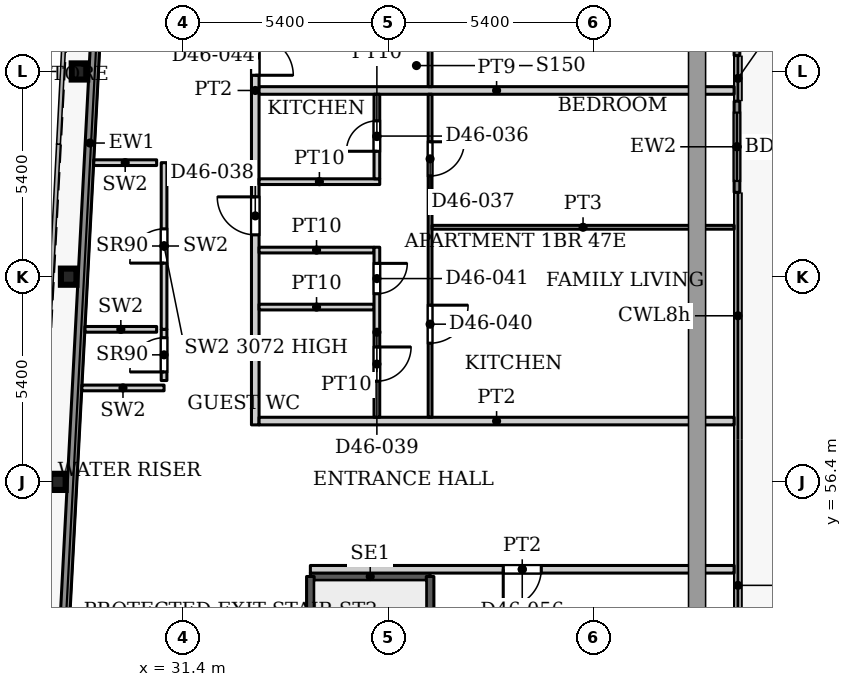
"""IFC4 building model, lengths in metres.
Left out: names, types, materials, properties, quantities, classifications, styles, units other than length and angle.
Written with IfcOpenShell. Run it as: python <this file> out.ifc"""

import sys

from ifc_helpers import new_model, si_unit, direction, frame, frame_2d, origin, origin_2d, place, context, subcontext, project, spatial, rectangle, i_section, extrude, source, transform, mapped, element, fill, save


model = new_model("IFC4")
c1 = context("Model", 3, precision=1e-05, world=origin(), true_north=direction((0.0, 1.0)))
c2 = subcontext(c1, "Body", "Model", "MODEL_VIEW")
j1 = project(units=[si_unit("LENGTHUNIT", "METRE"), si_unit("PLANEANGLEUNIT", "RADIAN")], contexts=[c1])
p1 = place(None, origin())
s1 = spatial("IfcSite", under=j1, at=p1, CompositionType="ELEMENT")
p2 = place(p1, origin())
s2 = spatial("IfcBuilding", under=s1, at=p2, CompositionType="ELEMENT")
p3 = place(p2, frame((0.0, 0.0, 199.4)))
s3 = spatial("IfcBuildingStorey", under=s2, at=p3, CompositionType="ELEMENT", Elevation=199.4)
for number, where, z_axis, x_axis in (
    (1, (28.106, 56.4, 0.0), (0.0, 0.0, 1.0), (1.0, 0.0, 0.0)),
    (2, (28.39, 61.8, 0.0), (0.0, 0.0, 1.0), (1.0, 0.0, 0.0)),
    (3, (28.674, 67.2, 0.0), (0.0, 0.0, 1.0), (1.0, 0.0, 0.0)),
):
    element("IfcColumn", number, at=place(p3, frame(where, z_axis=z_axis, x_axis=x_axis)), inside=s3, PredefinedType="COLUMN", context=c2, shape_type="SweptSolid", body=[
        extrude(i_section(OverallWidth=0.409, OverallDepth=0.425, WebThickness=0.033, FlangeThickness=0.052, FilletRadius=0.013, at=origin_2d()), origin(), (0.0, 0.0, 1.0), 3.9),
    ])
p4 = place(p3, frame((27.195, 31.969, 0.0), z_axis=(0.0, 0.0, 1.0), x_axis=(0.052554995867, 0.998618031286, 0.0)))
e4 = element("IfcWall", 4, at=p4, inside=s3, PredefinedType="SOLIDWALL", context=c2, shape_type="SweptSolid", body=[
    extrude(rectangle(XDim=66.787, YDim=0.25, at=frame_2d((33.394, 0.0))), origin(), (0.0, 0.0, 1.0), 3.75),
])
p5 = place(p3, frame((45.975, 70.018, 0.0), z_axis=(0.0, 0.0, 1.0), x_axis=(0.0, -1.0, 0.0)))
e5 = element("IfcWall", 5, at=p5, inside=s3, PredefinedType="SOLIDWALL", context=c2, shape_type="SweptSolid", body=[
    extrude(rectangle(XDim=2.4, YDim=0.15, at=frame_2d((1.2, 0.0))), origin(), (0.0, 0.0, 1.0), 3.75),
])
p6 = place(p5, frame((0.3, 0.0, 0.0)))
e6 = element("IfcOpeningElement", 6, at=p6, cuts=e5, PredefinedType="OPENING", context=c2, shape_type="SweptSolid", body=[
    extrude(rectangle(XDim=1.8, YDim=2.4, at=frame_2d((0.9, 1.2))), frame((0.0, 0.085, 0.0), z_axis=(0.0, -1.0, 0.0), x_axis=(1.0, 0.0, 0.0)), (0.0, 0.0, 1.0), 0.17),
])
p7 = place(p3, frame((45.975, 66.418, 0.0), z_axis=(0.0, 0.0, 1.0), x_axis=(0.0, -1.0, 0.0)))
e7 = element("IfcWall", 7, at=p7, inside=s3, PredefinedType="SOLIDWALL", context=c2, shape_type="SweptSolid", body=[
    extrude(rectangle(XDim=2.4, YDim=0.15, at=frame_2d((1.2, 0.0))), origin(), (0.0, 0.0, 1.0), 3.75),
])
p8 = place(p7, frame((0.3, 0.0, 0.0)))
e8 = element("IfcOpeningElement", 8, at=p8, cuts=e7, PredefinedType="OPENING", context=c2, shape_type="SweptSolid", body=[
    extrude(rectangle(XDim=1.8, YDim=2.4, at=frame_2d((0.9, 1.2))), frame((0.0, 0.085, 0.0), z_axis=(0.0, -1.0, 0.0), x_axis=(1.0, 0.0, 0.0)), (0.0, 0.0, 1.0), 0.17),
])
p9 = place(p3, frame((34.75, 53.91, 0.0), z_axis=(0.0, 0.0, 1.0), x_axis=(1.0, 0.0, 0.0)))
e9 = element("IfcWall", 9, at=p9, inside=s3, PredefinedType="SHEAR", context=c2, shape_type="SweptSolid", body=[
    extrude(rectangle(XDim=3.15, YDim=0.2, at=frame_2d((1.575, 0.0))), origin(), (0.0, 0.0, 1.0), 3.9),
])
p10 = place(p3, frame((34.75, 47.5, 0.0), z_axis=(0.0, 0.0, 1.0), x_axis=(0.0, 1.0, 0.0)))
e10 = element("IfcWall", 10, at=p10, inside=s3, PredefinedType="SHEAR", context=c2, shape_type="SweptSolid", body=[
    extrude(rectangle(XDim=6.41, YDim=0.2, at=frame_2d((3.205, 0.0))), origin(), (0.0, 0.0, 1.0), 3.9),
])
p11 = place(p3, frame((37.9, 44.75, 0.0), z_axis=(0.0, 0.0, 1.0), x_axis=(0.0, 1.0, 0.0)))
e11 = element("IfcWall", 11, at=p11, inside=s3, PredefinedType="SHEAR", context=c2, shape_type="SweptSolid", body=[
    extrude(rectangle(XDim=9.16, YDim=0.2, at=frame_2d((4.58, 0.0))), origin(), (0.0, 0.0, 1.0), 3.9),
])
p12 = place(p3, frame((28.738, 58.872, 0.0), z_axis=(0.0, 0.0, 1.0), x_axis=(1.0, 0.0, 0.0)))
e12 = element("IfcWall", 12, at=p12, inside=s3, PredefinedType="PARTITIONING", context=c2, shape_type="SweptSolid", body=[
    extrude(rectangle(XDim=2.162, YDim=0.15, at=frame_2d((1.081, 0.0))), origin(), (0.0, 0.0, 1.0), 3.9),
])
p13 = place(p3, frame((30.9, 59.067, 0.0), z_axis=(0.0, 0.0, 1.0), x_axis=(0.0, 1.0, 0.0)))
e13 = element("IfcWall", 13, at=p13, inside=s3, PredefinedType="PARTITIONING", context=c2, shape_type="SweptSolid", body=[
    extrude(rectangle(XDim=1.347, YDim=0.15, at=frame_2d((0.674, 0.0))), origin(), (0.0, 0.0, 1.0), 3.9),
])
p14 = place(p13, frame((0.226, 0.0, 0.0)))
e14 = element("IfcOpeningElement", 14, at=p14, cuts=e13, PredefinedType="OPENING", context=c2, shape_type="SweptSolid", body=[
    extrude(rectangle(XDim=0.9, YDim=2.2, at=frame_2d((0.45, 1.1))), frame((0.0, 0.085, 0.0), z_axis=(0.0, -1.0, 0.0), x_axis=(1.0, 0.0, 0.0)), (0.0, 0.0, 1.0), 0.17),
])
p15 = place(p3, frame((28.82, 60.414, 0.0), z_axis=(0.0, 0.0, 1.0), x_axis=(1.0, 0.0, 0.0)))
e15 = element("IfcWall", 15, at=p15, inside=s3, PredefinedType="PARTITIONING", context=c2, shape_type="SweptSolid", body=[
    extrude(rectangle(XDim=1.885, YDim=0.15, at=frame_2d((0.942, 0.0))), origin(), (0.0, 0.0, 1.0), 3.9),
])
p16 = place(p3, frame((30.9, 60.414, 0.0), z_axis=(0.0, 0.0, 1.0), x_axis=(0.0, 1.0, 0.0)))
e16 = element("IfcWall", 16, at=p16, inside=s3, PredefinedType="PARTITIONING", context=c2, shape_type="SweptSolid", body=[
    extrude(rectangle(XDim=4.386, YDim=0.15, at=frame_2d((2.193, 0.0))), origin(), (0.0, 0.0, 1.0), 3.072),
])
p17 = place(p16, frame((1.743, 0.0, 0.0)))
e17 = element("IfcOpeningElement", 17, at=p17, cuts=e16, PredefinedType="OPENING", context=c2, shape_type="SweptSolid", body=[
    extrude(rectangle(XDim=0.9, YDim=2.2, at=frame_2d((0.45, 1.1))), frame((0.0, 0.085, 0.0), z_axis=(0.0, -1.0, 0.0), x_axis=(1.0, 0.0, 0.0)), (0.0, 0.0, 1.0), 0.17),
])
p18 = place(p3, frame((29.05, 64.8, 0.0), z_axis=(0.0, 0.0, 1.0), x_axis=(1.0, 0.0, 0.0)))
e18 = element("IfcWall", 18, at=p18, inside=s3, PredefinedType="PARTITIONING", context=c2, shape_type="SweptSolid", body=[
    extrude(rectangle(XDim=1.655, YDim=0.15, at=frame_2d((0.828, 0.0))), origin(), (0.0, 0.0, 1.0), 3.9),
])
p19 = place(p3, frame((33.3, 57.9, 0.0), z_axis=(0.0, 0.0, 1.0), x_axis=(0.0, 1.0, 0.0)))
e19 = element("IfcWall", 19, at=p19, inside=s3, PredefinedType="PARTITIONING", context=c2, shape_type="SweptSolid", body=[
    extrude(rectangle(XDim=17.6, YDim=0.2, at=frame_2d((8.8, 0.0))), origin(), (0.0, 0.0, 1.0), 3.6),
])
p20 = place(p19, frame((5.0, 0.0, 0.0)))
e20 = element("IfcOpeningElement", 20, at=p20, cuts=e19, PredefinedType="OPENING", context=c2, shape_type="SweptSolid", body=[
    extrude(rectangle(XDim=1.0, YDim=2.1, at=frame_2d((0.5, 1.05))), frame((0.0, 0.11, 0.0), z_axis=(0.0, -1.0, 0.0), x_axis=(1.0, 0.0, 0.0)), (0.0, 0.0, 1.0), 0.22),
])
p21 = place(p19, frame((9.2, 0.0, 0.0)))
e21 = element("IfcOpeningElement", 21, at=p21, cuts=e19, PredefinedType="OPENING", context=c2, shape_type="SweptSolid", body=[
    extrude(rectangle(XDim=1.0, YDim=2.1, at=frame_2d((0.5, 1.05))), frame((0.0, 0.11, 0.0), z_axis=(0.0, -1.0, 0.0), x_axis=(1.0, 0.0, 0.0)), (0.0, 0.0, 1.0), 0.22),
])
p22 = place(p3, frame((33.4, 58.0, 0.0), z_axis=(0.0, 0.0, 1.0), x_axis=(1.0, 0.0, 0.0)))
e22 = element("IfcWall", 22, at=p22, inside=s3, PredefinedType="PARTITIONING", context=c2, shape_type="SweptSolid", body=[
    extrude(rectangle(XDim=12.5, YDim=0.2, at=frame_2d((6.25, 0.0))), origin(), (0.0, 0.0, 1.0), 3.6),
])
for number, where, z_axis, x_axis in (
    (23, (33.4, 61.0, 0.0), (0.0, 0.0, 1.0), (1.0, 0.0, 0.0)),
    (24, (33.4, 62.5, 0.0), (0.0, 0.0, 1.0), (1.0, 0.0, 0.0)),
):
    element("IfcWall", number, at=place(p3, frame(where, z_axis=z_axis, x_axis=x_axis)), inside=s3, PredefinedType="PARTITIONING", context=c2, shape_type="SweptSolid", body=[
        extrude(rectangle(XDim=3.025, YDim=0.15, at=frame_2d((1.513, 0.0))), origin(), (0.0, 0.0, 1.0), 3.6),
    ])
p23 = place(p3, frame((33.4, 64.3, 0.0), z_axis=(0.0, 0.0, 1.0), x_axis=(1.0, 0.0, 0.0)))
e25 = element("IfcWall", 25, at=p23, inside=s3, PredefinedType="PARTITIONING", context=c2, shape_type="SweptSolid", body=[
    extrude(rectangle(XDim=3.175, YDim=0.15, at=frame_2d((1.587, 0.0))), origin(), (0.0, 0.0, 1.0), 3.6),
])
p24 = place(p3, frame((33.4, 66.7, 0.0), z_axis=(0.0, 0.0, 1.0), x_axis=(1.0, 0.0, 0.0)))
e26 = element("IfcWall", 26, at=p24, inside=s3, PredefinedType="PARTITIONING", context=c2, shape_type="SweptSolid", body=[
    extrude(rectangle(XDim=12.5, YDim=0.2, at=frame_2d((6.25, 0.0))), origin(), (0.0, 0.0, 1.0), 3.6),
])
p25 = place(p3, frame((34.75, 54.1, 0.0), z_axis=(0.0, 0.0, 1.0), x_axis=(1.0, 0.0, 0.0)))
e27 = element("IfcWall", 27, at=p25, inside=s3, PredefinedType="PARTITIONING", context=c2, shape_type="SweptSolid", body=[
    extrude(rectangle(XDim=11.15, YDim=0.2, at=frame_2d((5.575, 0.0))), origin(), (0.0, 0.0, 1.0), 3.6),
])
p26 = place(p25, frame((5.075, 0.0, 0.0)))
e28 = element("IfcOpeningElement", 28, at=p26, cuts=e27, PredefinedType="OPENING", context=c2, shape_type="SweptSolid", body=[
    extrude(rectangle(XDim=1.0, YDim=2.1, at=frame_2d((0.5, 1.05))), frame((0.0, 0.11, 0.0), z_axis=(0.0, -1.0, 0.0), x_axis=(1.0, 0.0, 0.0)), (0.0, 0.0, 1.0), 0.22),
])
p27 = place(p3, frame((36.5, 58.1, 0.0), z_axis=(0.0, 0.0, 1.0), x_axis=(0.0, 1.0, 0.0)))
e29 = element("IfcWall", 29, at=p27, inside=s3, PredefinedType="PARTITIONING", context=c2, shape_type="SweptSolid", body=[
    extrude(rectangle(XDim=4.475, YDim=0.15, at=frame_2d((2.237, 0.0))), origin(), (0.0, 0.0, 1.0), 3.6),
])
p28 = place(p27, frame((0.95, 0.0, 0.0)))
e30 = element("IfcOpeningElement", 30, at=p28, cuts=e29, PredefinedType="OPENING", context=c2, shape_type="SweptSolid", body=[
    extrude(rectangle(XDim=0.9, YDim=2.1, at=frame_2d((0.45, 1.05))), frame((0.0, 0.085, 0.0), z_axis=(0.0, -1.0, 0.0), x_axis=(1.0, 0.0, 0.0)), (0.0, 0.0, 1.0), 0.17),
])
p29 = place(p27, frame((3.25, 0.0, 0.0)))
e31 = element("IfcOpeningElement", 31, at=p29, cuts=e29, PredefinedType="OPENING", context=c2, shape_type="SweptSolid", body=[
    extrude(rectangle(XDim=0.8, YDim=2.1, at=frame_2d((0.4, 1.05))), frame((0.0, 0.085, 0.0), z_axis=(0.0, -1.0, 0.0), x_axis=(1.0, 0.0, 0.0)), (0.0, 0.0, 1.0), 0.17),
])
p30 = place(p3, frame((36.5, 64.375, 0.0), z_axis=(0.0, 0.0, 1.0), x_axis=(0.0, 1.0, 0.0)))
e32 = element("IfcWall", 32, at=p30, inside=s3, PredefinedType="PARTITIONING", context=c2, shape_type="SweptSolid", body=[
    extrude(rectangle(XDim=2.225, YDim=0.15, at=frame_2d((1.113, 0.0))), origin(), (0.0, 0.0, 1.0), 3.6),
])
p31 = place(p30, frame((0.725, 0.0, 0.0)))
e33 = element("IfcOpeningElement", 33, at=p31, cuts=e32, PredefinedType="OPENING", context=c2, shape_type="SweptSolid", body=[
    extrude(rectangle(XDim=0.8, YDim=2.1, at=frame_2d((0.4, 1.05))), frame((0.0, 0.085, 0.0), z_axis=(0.0, -1.0, 0.0), x_axis=(1.0, 0.0, 0.0)), (0.0, 0.0, 1.0), 0.17),
])
p32 = place(p3, frame((37.9, 58.1, 0.0), z_axis=(0.0, 0.0, 1.0), x_axis=(0.0, 1.0, 0.0)))
e34 = element("IfcWall", 34, at=p32, inside=s3, PredefinedType="PARTITIONING", context=c2, shape_type="SweptSolid", body=[
    extrude(rectangle(XDim=8.5, YDim=0.1, at=frame_2d((4.25, 0.0))), origin(), (0.0, 0.0, 1.0), 3.6),
])
p33 = place(p32, frame((6.35, 0.0, 0.0)))
e35 = element("IfcOpeningElement", 35, at=p33, cuts=e34, PredefinedType="OPENING", context=c2, shape_type="SweptSolid", body=[
    extrude(rectangle(XDim=0.9, YDim=2.1, at=frame_2d((0.45, 1.05))), frame((0.0, 0.06, 0.0), z_axis=(0.0, -1.0, 0.0), x_axis=(1.0, 0.0, 0.0)), (0.0, 0.0, 1.0), 0.12),
])
p34 = place(p32, frame((1.95, 0.0, 0.0)))
e36 = element("IfcOpeningElement", 36, at=p34, cuts=e34, PredefinedType="OPENING", context=c2, shape_type="SweptSolid", body=[
    extrude(rectangle(XDim=1.0, YDim=2.1, at=frame_2d((0.5, 1.05))), frame((0.0, 0.06, 0.0), z_axis=(0.0, -1.0, 0.0), x_axis=(1.0, 0.0, 0.0)), (0.0, 0.0, 1.0), 0.12),
])
p35 = place(p3, frame((37.9, 66.8, 0.0), z_axis=(0.0, 0.0, 1.0), x_axis=(0.0, 1.0, 0.0)))
e37 = element("IfcWall", 37, at=p35, inside=s3, PredefinedType="PARTITIONING", context=c2, shape_type="SweptSolid", body=[
    extrude(rectangle(XDim=8.5, YDim=0.1, at=frame_2d((4.25, 0.0))), origin(), (0.0, 0.0, 1.0), 3.6),
])
p36 = place(p35, frame((6.2, 0.0, 0.0)))
e38 = element("IfcOpeningElement", 38, at=p36, cuts=e37, PredefinedType="OPENING", context=c2, shape_type="SweptSolid", body=[
    extrude(rectangle(XDim=0.9, YDim=2.1, at=frame_2d((0.45, 1.05))), frame((0.0, 0.06, 0.0), z_axis=(0.0, -1.0, 0.0), x_axis=(1.0, 0.0, 0.0)), (0.0, 0.0, 1.0), 0.12),
])
p37 = place(p35, frame((1.8, 0.0, 0.0)))
e39 = element("IfcOpeningElement", 39, at=p37, cuts=e37, PredefinedType="OPENING", context=c2, shape_type="SweptSolid", body=[
    extrude(rectangle(XDim=1.0, YDim=2.1, at=frame_2d((0.5, 1.05))), frame((0.0, 0.06, 0.0), z_axis=(0.0, -1.0, 0.0), x_axis=(1.0, 0.0, 0.0)), (0.0, 0.0, 1.0), 0.12),
])
p38 = place(p3, frame((37.95, 63.1, 0.0), z_axis=(0.0, 0.0, 1.0), x_axis=(1.0, 0.0, 0.0)))
e40 = element("IfcWall", 40, at=p38, inside=s3, PredefinedType="PARTITIONING", context=c2, shape_type="SweptSolid", body=[
    extrude(rectangle(XDim=7.95, YDim=0.1, at=frame_2d((3.975, 0.0))), origin(), (0.0, 0.0, 1.0), 3.6),
])
m1 = source(origin(), c2, "Body", "SweptSolid", [
    extrude(rectangle(XDim=1.8, YDim=2.4, at=frame_2d((0.9, 1.2))), frame((0.0, 0.025, 0.0), z_axis=(0.0, -1.0, 0.0), x_axis=(1.0, 0.0, 0.0)), (0.0, 0.0, 1.0), 0.05),
])
p39 = place(p8, origin())
e41 = element("IfcDoor", 41, at=p39, inside=s3, OperationType="SLIDING_TO_LEFT", PredefinedType="DOOR", context=c2, shape_type="MappedRepresentation", body=[
    mapped(m1, transform((0.0, 0.0, 0.0), x_axis=(1.0, 0.0, 0.0), y_axis=(0.0, 1.0, 0.0), z_axis=(0.0, 0.0, 1.0), scale=1.0)),
])
fill(e8, e41)
m2 = source(origin(), c2, "Body", "SweptSolid", [
    extrude(rectangle(XDim=0.9, YDim=2.2, at=frame_2d((0.45, 1.1))), frame((0.0, 0.025, 0.0), z_axis=(0.0, -1.0, 0.0), x_axis=(1.0, 0.0, 0.0)), (0.0, 0.0, 1.0), 0.05),
])
p40 = place(p14, origin())
e42 = element("IfcDoor", 42, at=p40, inside=s3, OperationType="SINGLE_SWING_LEFT", PredefinedType="DOOR", context=c2, shape_type="MappedRepresentation", body=[
    mapped(m2, transform((0.0, 0.0, 0.0), x_axis=(1.0, 0.0, 0.0), y_axis=(0.0, 1.0, 0.0), z_axis=(0.0, 0.0, 1.0), scale=1.0)),
])
fill(e14, e42)
p41 = place(p17, origin())
e43 = element("IfcDoor", 43, at=p41, inside=s3, OperationType="SINGLE_SWING_LEFT", PredefinedType="DOOR", context=c2, shape_type="MappedRepresentation", body=[
    mapped(m2, transform((0.0, 0.0, 0.0), x_axis=(1.0, 0.0, 0.0), y_axis=(0.0, 1.0, 0.0), z_axis=(0.0, 0.0, 1.0), scale=1.0)),
])
fill(e17, e43)
m3 = source(origin(), c2, "Body", "SweptSolid", [
    extrude(rectangle(XDim=0.8, YDim=2.1, at=frame_2d((0.4, 1.05))), frame((0.0, 0.025, 0.0), z_axis=(0.0, -1.0, 0.0), x_axis=(1.0, 0.0, 0.0)), (0.0, 0.0, 1.0), 0.05),
])
p42 = place(p31, origin())
e44 = element("IfcDoor", 44, at=p42, inside=s3, OperationType="SINGLE_SWING_LEFT", PredefinedType="DOOR", context=c2, shape_type="MappedRepresentation", body=[
    mapped(m3, transform((0.0, 0.0, 0.0), x_axis=(1.0, 0.0, 0.0), y_axis=(0.0, 1.0, 0.0), z_axis=(0.0, 0.0, 1.0), scale=1.0)),
])
fill(e33, e44)
m4 = source(origin(), c2, "Body", "SweptSolid", [
    extrude(rectangle(XDim=0.9, YDim=2.1, at=frame_2d((0.45, 1.05))), frame((0.0, 0.025, 0.0), z_axis=(0.0, -1.0, 0.0), x_axis=(1.0, 0.0, 0.0)), (0.0, 0.0, 1.0), 0.05),
])
p43 = place(p33, origin())
e45 = element("IfcDoor", 45, at=p43, inside=s3, OperationType="SINGLE_SWING_RIGHT", PredefinedType="DOOR", context=c2, shape_type="MappedRepresentation", body=[
    mapped(m4, transform((0.0, 0.0, 0.0), x_axis=(1.0, 0.0, 0.0), y_axis=(0.0, 1.0, 0.0), z_axis=(0.0, 0.0, 1.0), scale=1.0)),
])
fill(e35, e45)
m5 = source(origin(), c2, "Body", "SweptSolid", [
    extrude(rectangle(XDim=1.0, YDim=2.1, at=frame_2d((0.5, 1.05))), frame((0.0, 0.025, 0.0), z_axis=(0.0, -1.0, 0.0), x_axis=(1.0, 0.0, 0.0)), (0.0, 0.0, 1.0), 0.05),
])
p44 = place(p20, origin())
e46 = element("IfcDoor", 46, at=p44, inside=s3, OperationType="SINGLE_SWING_LEFT", PredefinedType="DOOR", context=c2, shape_type="MappedRepresentation", body=[
    mapped(m5, transform((0.0, 0.0, 0.0), x_axis=(1.0, 0.0, 0.0), y_axis=(0.0, 1.0, 0.0), z_axis=(0.0, 0.0, 1.0), scale=1.0)),
])
fill(e20, e46)
p45 = place(p28, origin())
e47 = element("IfcDoor", 47, at=p45, inside=s3, OperationType="SINGLE_SWING_RIGHT", PredefinedType="DOOR", context=c2, shape_type="MappedRepresentation", body=[
    mapped(m4, transform((0.0, 0.0, 0.0), x_axis=(1.0, 0.0, 0.0), y_axis=(0.0, 1.0, 0.0), z_axis=(0.0, 0.0, 1.0), scale=1.0)),
])
fill(e30, e47)
m6 = source(origin(), c2, "Body", "SweptSolid", [
    extrude(rectangle(XDim=1.0, YDim=2.1, at=frame_2d((0.5, 1.05))), frame((0.0, 0.025, 0.0), z_axis=(0.0, -1.0, 0.0), x_axis=(1.0, 0.0, 0.0)), (0.0, 0.0, 1.0), 0.05),
])
p46 = place(p34, origin())
e48 = element("IfcDoor", 48, at=p46, inside=s3, OperationType="SINGLE_SWING_RIGHT", PredefinedType="DOOR", context=c2, shape_type="MappedRepresentation", body=[
    mapped(m6, transform((0.0, 0.0, 0.0), x_axis=(1.0, 0.0, 0.0), y_axis=(0.0, 1.0, 0.0), z_axis=(0.0, 0.0, 1.0), scale=1.0)),
])
fill(e36, e48)
p47 = place(p29, origin())
e49 = element("IfcDoor", 49, at=p47, inside=s3, OperationType="SINGLE_SWING_RIGHT", PredefinedType="DOOR", context=c2, shape_type="MappedRepresentation", body=[
    mapped(m3, transform((0.0, 0.0, 0.0), x_axis=(1.0, 0.0, 0.0), y_axis=(0.0, 1.0, 0.0), z_axis=(0.0, 0.0, 1.0), scale=1.0)),
])
fill(e31, e49)
p48 = place(p21, origin())
e50 = element("IfcDoor", 50, at=p48, inside=s3, OperationType="SINGLE_SWING_RIGHT", PredefinedType="DOOR", context=c2, shape_type="MappedRepresentation", body=[
    mapped(m5, transform((0.0, 0.0, 0.0), x_axis=(1.0, 0.0, 0.0), y_axis=(0.0, 1.0, 0.0), z_axis=(0.0, 0.0, 1.0), scale=1.0)),
])
fill(e21, e50)
m7 = source(origin(), c2, "Body", "SweptSolid", [
    extrude(rectangle(XDim=1.0, YDim=2.1, at=frame_2d((0.5, 1.05))), frame((0.0, 0.025, 0.0), z_axis=(0.0, -1.0, 0.0), x_axis=(1.0, 0.0, 0.0)), (0.0, 0.0, 1.0), 0.05),
])
p49 = place(p26, origin())
e51 = element("IfcDoor", 51, at=p49, inside=s3, OperationType="SINGLE_SWING_RIGHT", PredefinedType="DOOR", context=c2, shape_type="MappedRepresentation", body=[
    mapped(m7, transform((0.0, 0.0, 0.0), x_axis=(1.0, 0.0, 0.0), y_axis=(0.0, 1.0, 0.0), z_axis=(0.0, 0.0, 1.0), scale=1.0)),
])
fill(e28, e51)
save(model, sys.argv[1])
